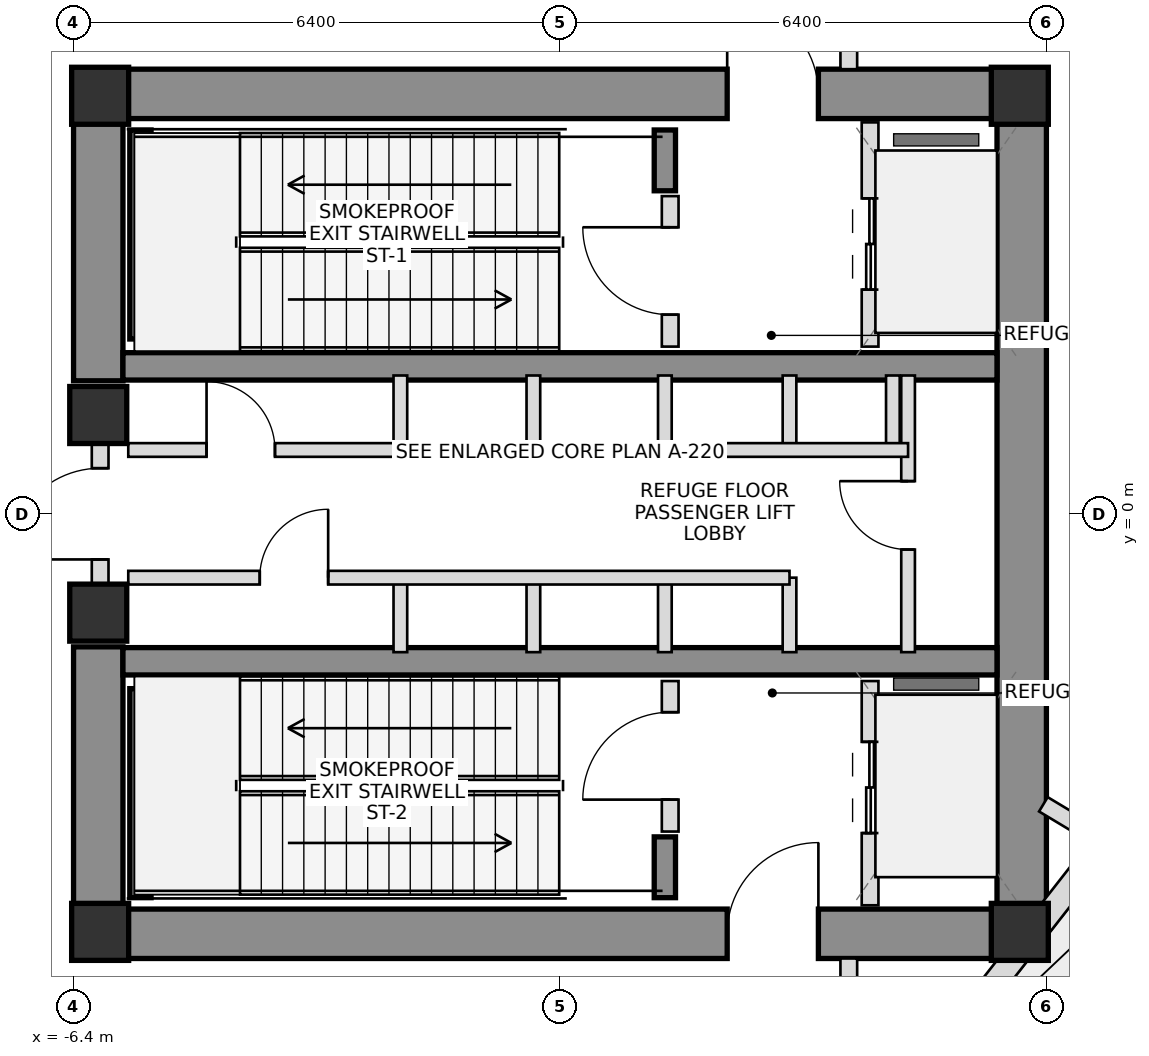
"""IFC4 building model, lengths in metres.
Left out: names, types, materials, properties, quantities, classifications, styles, units other than length and angle.
Written with IfcOpenShell. Run it as: python <this file> out.ifc"""

import sys

from ifc_helpers import new_model, si_unit, direction, frame, frame_2d, origin, origin_2d, place, context, subcontext, project, spatial, rectangle, extrude, source, transform, mapped, element, fill, save


model = new_model("IFC4")
c1 = context("Model", 3, precision=1e-05, world=origin(), true_north=direction((0.0, 1.0)))
c2 = subcontext(c1, "Body", "Model", "MODEL_VIEW")
j1 = project(units=[si_unit("LENGTHUNIT", "METRE"), si_unit("PLANEANGLEUNIT", "RADIAN")], contexts=[c1])
p1 = place(None, origin())
s1 = spatial("IfcSite", under=j1, at=p1, CompositionType="ELEMENT")
p2 = place(p1, origin())
s2 = spatial("IfcBuilding", under=s1, at=p2, CompositionType="ELEMENT")
p3 = place(p2, frame((0.0, 0.0, 219.05)))
s3 = spatial("IfcBuildingStorey", under=s2, at=p3, CompositionType="ELEMENT", Elevation=219.05)
m1 = source(origin(), c2, "Body", "SweptSolid", [
    extrude(rectangle(XDim=0.75, YDim=0.75, at=origin_2d()), origin(), (0.0, 0.0, 1.0), 5.1),
])
for number, where, z_axis, x_axis in (
    (1, (-6.05, -5.5, 0.0), (0.0, 0.0, 1.0), (1.0, 0.0, 0.0)),
    (2, (6.05, -5.5, 0.0), (0.0, 0.0, 1.0), (1.0, 0.0, 0.0)),
    (3, (6.05, 5.5, 0.0), (0.0, 0.0, 1.0), (1.0, 0.0, 0.0)),
    (4, (-6.05, 5.5, 0.0), (0.0, 0.0, 1.0), (1.0, 0.0, 0.0)),
):
    element("IfcColumn", number, at=place(p3, frame(where, z_axis=z_axis, x_axis=x_axis)), inside=s3, PredefinedType="COLUMN", context=c2, shape_type="MappedRepresentation", body=[
        mapped(m1, transform((0.0, 0.0, 0.0), scale=1.0)),
    ])
p4 = place(p3, frame((-6.4, 5.525, 0.0), z_axis=(0.0, 0.0, 1.0), x_axis=(1.0, 0.0, 0.0)))
e5 = element("IfcWall", 5, at=p4, inside=s3, PredefinedType="SHEAR", context=c2, shape_type="SweptSolid", body=[
    extrude(rectangle(XDim=12.8, YDim=0.65, at=frame_2d((6.4, 0.0))), origin(), (0.0, 0.0, 1.0), 5.1),
])
p5 = place(p4, frame((8.6, 0.0, 0.0)))
e6 = element("IfcOpeningElement", 6, at=p5, cuts=e5, PredefinedType="OPENING", context=c2, shape_type="SweptSolid", body=[
    extrude(rectangle(XDim=1.2, YDim=2.2, at=frame_2d((0.6, 1.1))), frame((0.0, 0.335, 0.0), z_axis=(0.0, -1.0, 0.0), x_axis=(1.0, 0.0, 0.0)), (0.0, 0.0, 1.0), 0.67),
])
p6 = place(p3, frame((-6.4, -5.525, 0.0), z_axis=(0.0, 0.0, 1.0), x_axis=(1.0, 0.0, 0.0)))
e7 = element("IfcWall", 7, at=p6, inside=s3, PredefinedType="SHEAR", context=c2, shape_type="SweptSolid", body=[
    extrude(rectangle(XDim=12.8, YDim=0.65, at=frame_2d((6.4, 0.0))), origin(), (0.0, 0.0, 1.0), 5.1),
])
p7 = place(p6, frame((8.6, 0.0, 0.0)))
e8 = element("IfcOpeningElement", 8, at=p7, cuts=e7, PredefinedType="OPENING", context=c2, shape_type="SweptSolid", body=[
    extrude(rectangle(XDim=1.2, YDim=2.2, at=frame_2d((0.6, 1.1))), frame((0.0, 0.335, 0.0), z_axis=(0.0, -1.0, 0.0), x_axis=(1.0, 0.0, 0.0)), (0.0, 0.0, 1.0), 0.67),
])
p8 = place(p3, frame((6.075, -5.2, 0.0), z_axis=(0.0, 0.0, 1.0), x_axis=(0.0, 1.0, 0.0)))
e9 = element("IfcWall", 9, at=p8, inside=s3, PredefinedType="SHEAR", context=c2, shape_type="SweptSolid", body=[
    extrude(rectangle(XDim=10.4, YDim=0.65, at=frame_2d((5.2, 0.0))), origin(), (0.0, 0.0, 1.0), 5.1),
])
for number, where, z_axis, x_axis in (
    (10, (-6.075, -5.2, 0.0), (0.0, 0.0, 1.0), (0.0, 1.0, 0.0)),
    (11, (-6.075, 1.75, 0.0), (0.0, 0.0, 1.0), (0.0, 1.0, 0.0)),
):
    element("IfcWall", number, at=place(p3, frame(where, z_axis=z_axis, x_axis=x_axis)), inside=s3, PredefinedType="SHEAR", context=c2, shape_type="SweptSolid", body=[
        extrude(rectangle(XDim=3.45, YDim=0.65, at=frame_2d((1.725, 0.0))), origin(), (0.0, 0.0, 1.0), 5.1),
    ])
for number, where, z_axis, x_axis in (
    (12, (-5.75, 1.94, 0.0), (0.0, 0.0, 1.0), (1.0, 0.0, 0.0)),
    (13, (-5.75, -1.94, 0.0), (0.0, 0.0, 1.0), (1.0, 0.0, 0.0)),
):
    element("IfcWall", number, at=place(p3, frame(where, z_axis=z_axis, x_axis=x_axis)), inside=s3, PredefinedType="SHEAR", context=c2, shape_type="SweptSolid", body=[
        extrude(rectangle(XDim=11.5, YDim=0.36, at=frame_2d((5.75, 0.0))), origin(), (0.0, 0.0, 1.0), 5.1),
    ])
p9 = place(p3, frame((-5.52, 2.3, 0.0), z_axis=(0.0, 0.0, 1.0), x_axis=(0.0, 1.0, 0.0)))
e14 = element("IfcWall", 14, at=p9, inside=s3, PredefinedType="SHEAR", context=c2, shape_type="SweptSolid", body=[
    extrude(rectangle(XDim=2.75, YDim=0.28, at=frame_2d((1.375, 0.0))), origin(), (0.0, 0.0, 1.0), 5.1),
])
p10 = place(p3, frame((1.38, 4.25, 0.0), z_axis=(0.0, 0.0, 1.0), x_axis=(0.0, 1.0, 0.0)))
e15 = element("IfcWall", 15, at=p10, inside=s3, PredefinedType="SHEAR", context=c2, shape_type="SweptSolid", body=[
    extrude(rectangle(XDim=0.8, YDim=0.28, at=frame_2d((0.4, 0.0))), origin(), (0.0, 0.0, 1.0), 5.1),
])
p11 = place(p3, frame((-5.52, -5.05, 0.0), z_axis=(0.0, 0.0, 1.0), x_axis=(0.0, 1.0, 0.0)))
e16 = element("IfcWall", 16, at=p11, inside=s3, PredefinedType="SHEAR", context=c2, shape_type="SweptSolid", body=[
    extrude(rectangle(XDim=2.75, YDim=0.28, at=frame_2d((1.375, 0.0))), origin(), (0.0, 0.0, 1.0), 5.1),
])
p12 = place(p3, frame((1.38, -5.05, 0.0), z_axis=(0.0, 0.0, 1.0), x_axis=(0.0, 1.0, 0.0)))
e17 = element("IfcWall", 17, at=p12, inside=s3, PredefinedType="SHEAR", context=c2, shape_type="SweptSolid", body=[
    extrude(rectangle(XDim=0.8, YDim=0.28, at=frame_2d((0.4, 0.0))), origin(), (0.0, 0.0, 1.0), 5.1),
])
for number, where, z_axis, x_axis in (
    (18, (-6.075, -1.3, 0.0), (0.0, 0.0, 1.0), (1.0, 0.0, 0.0)),
    (19, (-6.075, 1.3, 0.0), (0.0, 0.0, 1.0), (1.0, 0.0, 0.0)),
):
    element("IfcColumn", number, at=place(p3, frame(where, z_axis=z_axis, x_axis=x_axis)), inside=s3, PredefinedType="COLUMN", context=c2, shape_type="MappedRepresentation", body=[
        mapped(m1, transform((0.0, 0.0, 0.0), scale=1.0)),
    ])
p13 = place(p3, frame((-6.05, -0.95, 0.0), z_axis=(0.0, 0.0, 1.0), x_axis=(0.0, 1.0, 0.0)))
e20 = element("IfcWall", 20, at=p13, inside=s3, PredefinedType="PLUMBINGWALL", context=c2, shape_type="SweptSolid", body=[
    extrude(rectangle(XDim=1.9, YDim=0.22, at=frame_2d((0.95, 0.0))), origin(), (0.0, 0.0, 1.0), 3.88),
])
p14 = place(p13, frame((0.35, 0.0, 0.0)))
e21 = element("IfcOpeningElement", 21, at=p14, cuts=e20, PredefinedType="OPENING", context=c2, shape_type="SweptSolid", body=[
    extrude(rectangle(XDim=1.2, YDim=2.2, at=frame_2d((0.6, 1.1))), frame((0.0, 0.12, 0.0), z_axis=(0.0, -1.0, 0.0), x_axis=(1.0, 0.0, 0.0)), (0.0, 0.0, 1.0), 0.24),
])
p15 = place(p3, frame((1.45, 2.2, 0.0), z_axis=(0.0, 0.0, 1.0), x_axis=(0.0, 1.0, 0.0)))
e22 = element("IfcWall", 22, at=p15, inside=s3, PredefinedType="PLUMBINGWALL", context=c2, shape_type="SweptSolid", body=[
    extrude(rectangle(XDim=1.98, YDim=0.22, at=frame_2d((0.99, 0.0))), origin(), (0.0, 0.0, 1.0), 4.9),
])
p16 = place(p15, frame((0.42, 0.0, 0.0)))
e23 = element("IfcOpeningElement", 23, at=p16, cuts=e22, PredefinedType="OPENING", context=c2, shape_type="SweptSolid", body=[
    extrude(rectangle(XDim=1.15, YDim=2.15, at=frame_2d((0.575, 1.075))), frame((0.0, 0.12, 0.0), z_axis=(0.0, -1.0, 0.0), x_axis=(1.0, 0.0, 0.0)), (0.0, 0.0, 1.0), 0.24),
])
p17 = place(p3, frame((4.08, 2.2, 0.0), z_axis=(0.0, 0.0, 1.0), x_axis=(0.0, 1.0, 0.0)))
e24 = element("IfcWall", 24, at=p17, inside=s3, PredefinedType="PLUMBINGWALL", context=c2, shape_type="SweptSolid", body=[
    extrude(rectangle(XDim=2.95, YDim=0.22, at=frame_2d((1.475, 0.0))), origin(), (0.0, 0.0, 1.0), 4.9),
])
p18 = place(p17, frame((0.75, 0.0, 0.0)))
e25 = element("IfcOpeningElement", 25, at=p18, cuts=e24, PredefinedType="OPENING", context=c2, shape_type="SweptSolid", body=[
    extrude(rectangle(XDim=1.2, YDim=2.25, at=frame_2d((0.6, 1.125))), frame((0.0, 0.12, 0.0), z_axis=(0.0, -1.0, 0.0), x_axis=(1.0, 0.0, 0.0)), (0.0, 0.0, 1.0), 0.24),
])
p19 = place(p3, frame((1.45, -4.18, 0.0), z_axis=(0.0, 0.0, 1.0), x_axis=(0.0, 1.0, 0.0)))
e26 = element("IfcWall", 26, at=p19, inside=s3, PredefinedType="PLUMBINGWALL", context=c2, shape_type="SweptSolid", body=[
    extrude(rectangle(XDim=1.98, YDim=0.22, at=frame_2d((0.99, 0.0))), origin(), (0.0, 0.0, 1.0), 4.9),
])
p20 = place(p19, frame((0.42, 0.0, 0.0)))
e27 = element("IfcOpeningElement", 27, at=p20, cuts=e26, PredefinedType="OPENING", context=c2, shape_type="SweptSolid", body=[
    extrude(rectangle(XDim=1.15, YDim=2.15, at=frame_2d((0.575, 1.075))), frame((0.0, 0.12, 0.0), z_axis=(0.0, -1.0, 0.0), x_axis=(1.0, 0.0, 0.0)), (0.0, 0.0, 1.0), 0.24),
])
p21 = place(p3, frame((4.08, -5.15, 0.0), z_axis=(0.0, 0.0, 1.0), x_axis=(0.0, 1.0, 0.0)))
e28 = element("IfcWall", 28, at=p21, inside=s3, PredefinedType="PLUMBINGWALL", context=c2, shape_type="SweptSolid", body=[
    extrude(rectangle(XDim=2.95, YDim=0.22, at=frame_2d((1.475, 0.0))), origin(), (0.0, 0.0, 1.0), 4.9),
])
p22 = place(p21, frame((0.95, 0.0, 0.0)))
e29 = element("IfcOpeningElement", 29, at=p22, cuts=e28, PredefinedType="OPENING", context=c2, shape_type="SweptSolid", body=[
    extrude(rectangle(XDim=1.2, YDim=2.25, at=frame_2d((0.6, 1.125))), frame((0.0, 0.12, 0.0), z_axis=(0.0, -1.0, 0.0), x_axis=(1.0, 0.0, 0.0)), (0.0, 0.0, 1.0), 0.24),
])
for number, where, z_axis, x_axis in (
    (30, (-2.1, 0.84, 0.0), (0.0, 0.0, 1.0), (0.0, 1.0, 0.0)),
    (31, (-2.1, -1.82, 0.0), (0.0, 0.0, 1.0), (0.0, 1.0, 0.0)),
    (32, (-0.35, 0.84, 0.0), (0.0, 0.0, 1.0), (0.0, 1.0, 0.0)),
    (33, (-0.35, -1.82, 0.0), (0.0, 0.0, 1.0), (0.0, 1.0, 0.0)),
    (34, (1.38, 0.84, 0.0), (0.0, 0.0, 1.0), (0.0, 1.0, 0.0)),
    (35, (1.38, -1.82, 0.0), (0.0, 0.0, 1.0), (0.0, 1.0, 0.0)),
    (36, (3.02, 0.84, 0.0), (0.0, 0.0, 1.0), (0.0, 1.0, 0.0)),
    (37, (4.38, 0.84, 0.0), (0.0, 0.0, 1.0), (0.0, 1.0, 0.0)),
    (38, (3.02, -1.82, 0.0), (0.0, 0.0, 1.0), (0.0, 1.0, 0.0)),
):
    element("IfcWall", number, at=place(p3, frame(where, z_axis=z_axis, x_axis=x_axis)), inside=s3, PredefinedType="PLUMBINGWALL", context=c2, shape_type="SweptSolid", body=[
        extrude(rectangle(XDim=0.98, YDim=0.18, at=frame_2d((0.49, 0.0))), origin(), (0.0, 0.0, 1.0), 4.9),
    ])
p23 = place(p3, frame((4.58, -1.82, 0.0), z_axis=(0.0, 0.0, 1.0), x_axis=(0.0, 1.0, 0.0)))
e39 = element("IfcWall", 39, at=p23, inside=s3, PredefinedType="PLUMBINGWALL", context=c2, shape_type="SweptSolid", body=[
    extrude(rectangle(XDim=3.64, YDim=0.18, at=frame_2d((1.82, 0.0))), origin(), (0.0, 0.0, 1.0), 4.9),
])
p24 = place(p23, frame((1.35, 0.0, 0.0)))
e40 = element("IfcOpeningElement", 40, at=p24, cuts=e39, PredefinedType="OPENING", context=c2, shape_type="SweptSolid", body=[
    extrude(rectangle(XDim=0.9, YDim=2.05, at=frame_2d((0.45, 1.025))), frame((0.0, 0.1, 0.0), z_axis=(0.0, -1.0, 0.0), x_axis=(1.0, 0.0, 0.0)), (0.0, 0.0, 1.0), 0.2),
])
p25 = place(p3, frame((-5.68, 0.84, 0.0), z_axis=(0.0, 0.0, 1.0), x_axis=(1.0, 0.0, 0.0)))
e41 = element("IfcWall", 41, at=p25, inside=s3, PredefinedType="PLUMBINGWALL", context=c2, shape_type="SweptSolid", body=[
    extrude(rectangle(XDim=10.26, YDim=0.18, at=frame_2d((5.13, 0.0))), origin(), (0.0, 0.0, 1.0), 4.9),
])
p26 = place(p25, frame((1.03, 0.0, 0.0)))
e42 = element("IfcOpeningElement", 42, at=p26, cuts=e41, PredefinedType="OPENING", context=c2, shape_type="SweptSolid", body=[
    extrude(rectangle(XDim=0.9, YDim=2.05, at=frame_2d((0.45, 1.025))), frame((0.0, 0.1, 0.0), z_axis=(0.0, -1.0, 0.0), x_axis=(1.0, 0.0, 0.0)), (0.0, 0.0, 1.0), 0.2),
])
p27 = place(p3, frame((-5.68, -0.84, 0.0), z_axis=(0.0, 0.0, 1.0), x_axis=(1.0, 0.0, 0.0)))
e43 = element("IfcWall", 43, at=p27, inside=s3, PredefinedType="PLUMBINGWALL", context=c2, shape_type="SweptSolid", body=[
    extrude(rectangle(XDim=8.7, YDim=0.18, at=frame_2d((4.35, 0.0))), origin(), (0.0, 0.0, 1.0), 4.9),
])
p28 = place(p27, frame((1.73, 0.0, 0.0)))
e44 = element("IfcOpeningElement", 44, at=p28, cuts=e43, PredefinedType="OPENING", context=c2, shape_type="SweptSolid", body=[
    extrude(rectangle(XDim=0.9, YDim=2.05, at=frame_2d((0.45, 1.025))), frame((0.0, 0.1, 0.0), z_axis=(0.0, -1.0, 0.0), x_axis=(1.0, 0.0, 0.0)), (0.0, 0.0, 1.0), 0.2),
])
p29 = place(p3, frame((8.53, -2.581, 0.0), z_axis=(0.0, 0.0, 1.0), x_axis=(-0.616200634927, -0.787589218765, 0.0)))
e45 = element("IfcWall", 45, at=p29, inside=s3, PredefinedType="SOLIDWALL", context=c2, shape_type="SweptSolid", body=[
    extrude(rectangle(XDim=7.157, YDim=0.32, at=frame_2d((3.578, 0.0))), origin(), (0.0, 0.0, 1.0), 3.555),
])
p30 = place(p3, frame((6.36, -3.822, 0.0), z_axis=(0.0, 0.0, 1.0), x_axis=(0.85709698236, -0.515155086193, 0.0)))
e46 = element("IfcWall", 46, at=p30, inside=s3, PredefinedType="PLUMBINGWALL", context=c2, shape_type="SweptSolid", body=[
    extrude(rectangle(XDim=0.871, YDim=0.22, at=frame_2d((0.436, 0.0))), origin(), (0.0, 0.0, 1.0), 4.9),
])
p31 = place(p3, frame((3.8, 8.266, 0.0), z_axis=(0.0, 0.0, 1.0), x_axis=(0.0, -1.0, 0.0)))
e47 = element("IfcWall", 47, at=p31, inside=s3, PredefinedType="PLUMBINGWALL", context=c2, shape_type="SweptSolid", body=[
    extrude(rectangle(XDim=2.416, YDim=0.22, at=frame_2d((1.208, 0.0))), origin(), (0.0, 0.0, 1.0), 4.9),
])
p32 = place(p3, frame((3.8, -5.85, 0.0), z_axis=(0.0, 0.0, 1.0), x_axis=(0.0, -1.0, 0.0)))
e48 = element("IfcWall", 48, at=p32, inside=s3, PredefinedType="PLUMBINGWALL", context=c2, shape_type="SweptSolid", body=[
    extrude(rectangle(XDim=2.45, YDim=0.22, at=frame_2d((1.225, 0.0))), origin(), (0.0, 0.0, 1.0), 4.9),
])
p33 = place(p5, origin())
e49 = element("IfcDoor", 49, at=p33, inside=s3, OperationType="SINGLE_SWING_LEFT", PredefinedType="DOOR", context=c2, shape_type="SweptSolid", body=[
    extrude(rectangle(XDim=1.2, YDim=2.2, at=frame_2d((0.6, 1.1))), frame((0.0, 0.025, 0.0), z_axis=(0.0, -1.0, 0.0), x_axis=(1.0, 0.0, 0.0)), (0.0, 0.0, 1.0), 0.05),
])
fill(e6, e49)
p34 = place(p7, origin())
e50 = element("IfcDoor", 50, at=p34, inside=s3, OperationType="SINGLE_SWING_RIGHT", PredefinedType="DOOR", context=c2, shape_type="SweptSolid", body=[
    extrude(rectangle(XDim=1.2, YDim=2.2, at=frame_2d((0.6, 1.1))), frame((0.0, 0.025, 0.0), z_axis=(0.0, -1.0, 0.0), x_axis=(1.0, 0.0, 0.0)), (0.0, 0.0, 1.0), 0.05),
])
fill(e8, e50)
p35 = place(p14, origin())
e51 = element("IfcDoor", 51, at=p35, inside=s3, OperationType="SINGLE_SWING_LEFT", PredefinedType="DOOR", context=c2, shape_type="SweptSolid", body=[
    extrude(rectangle(XDim=1.2, YDim=2.2, at=frame_2d((0.6, 1.1))), frame((0.0, 0.025, 0.0), z_axis=(0.0, -1.0, 0.0), x_axis=(1.0, 0.0, 0.0)), (0.0, 0.0, 1.0), 0.05),
])
fill(e21, e51)
p36 = place(p16, origin())
e52 = element("IfcDoor", 52, at=p36, inside=s3, OperationType="SINGLE_SWING_RIGHT", PredefinedType="DOOR", context=c2, shape_type="SweptSolid", body=[
    extrude(rectangle(XDim=1.15, YDim=2.15, at=frame_2d((0.575, 1.075))), frame((0.0, 0.025, 0.0), z_axis=(0.0, -1.0, 0.0), x_axis=(1.0, 0.0, 0.0)), (0.0, 0.0, 1.0), 0.05),
])
fill(e23, e52)
p37 = place(p18, origin())
e53 = element("IfcDoor", 53, at=p37, inside=s3, OperationType="DOUBLE_DOOR_SLIDING", PredefinedType="DOOR", context=c2, shape_type="SweptSolid", body=[
    extrude(rectangle(XDim=1.2, YDim=2.25, at=frame_2d((0.6, 1.125))), frame((0.0, 0.025, 0.0), z_axis=(0.0, -1.0, 0.0), x_axis=(1.0, 0.0, 0.0)), (0.0, 0.0, 1.0), 0.05),
])
fill(e25, e53)
p38 = place(p20, origin())
e54 = element("IfcDoor", 54, at=p38, inside=s3, OperationType="SINGLE_SWING_LEFT", PredefinedType="DOOR", context=c2, shape_type="SweptSolid", body=[
    extrude(rectangle(XDim=1.15, YDim=2.15, at=frame_2d((0.575, 1.075))), frame((0.0, 0.025, 0.0), z_axis=(0.0, -1.0, 0.0), x_axis=(1.0, 0.0, 0.0)), (0.0, 0.0, 1.0), 0.05),
])
fill(e27, e54)
p39 = place(p22, origin())
e55 = element("IfcDoor", 55, at=p39, inside=s3, OperationType="DOUBLE_DOOR_SLIDING", PredefinedType="DOOR", context=c2, shape_type="SweptSolid", body=[
    extrude(rectangle(XDim=1.2, YDim=2.25, at=frame_2d((0.6, 1.125))), frame((0.0, 0.025, 0.0), z_axis=(0.0, -1.0, 0.0), x_axis=(1.0, 0.0, 0.0)), (0.0, 0.0, 1.0), 0.05),
])
fill(e29, e55)
p40 = place(p24, origin())
e56 = element("IfcDoor", 56, at=p40, inside=s3, OperationType="SINGLE_SWING_RIGHT", PredefinedType="DOOR", context=c2, shape_type="SweptSolid", body=[
    extrude(rectangle(XDim=0.9, YDim=2.05, at=frame_2d((0.45, 1.025))), frame((0.0, 0.025, 0.0), z_axis=(0.0, -1.0, 0.0), x_axis=(1.0, 0.0, 0.0)), (0.0, 0.0, 1.0), 0.05),
])
fill(e40, e56)
p41 = place(p26, origin())
e57 = element("IfcDoor", 57, at=p41, inside=s3, OperationType="SINGLE_SWING_LEFT", PredefinedType="DOOR", context=c2, shape_type="SweptSolid", body=[
    extrude(rectangle(XDim=0.9, YDim=2.05, at=frame_2d((0.45, 1.025))), frame((0.0, 0.025, 0.0), z_axis=(0.0, -1.0, 0.0), x_axis=(1.0, 0.0, 0.0)), (0.0, 0.0, 1.0), 0.05),
])
fill(e42, e57)
p42 = place(p28, origin())
e58 = element("IfcDoor", 58, at=p42, inside=s3, OperationType="SINGLE_SWING_RIGHT", PredefinedType="DOOR", context=c2, shape_type="SweptSolid", body=[
    extrude(rectangle(XDim=0.9, YDim=2.05, at=frame_2d((0.45, 1.025))), frame((0.0, 0.025, 0.0), z_axis=(0.0, -1.0, 0.0), x_axis=(1.0, 0.0, 0.0)), (0.0, 0.0, 1.0), 0.05),
])
fill(e44, e58)
save(model, sys.argv[1])
